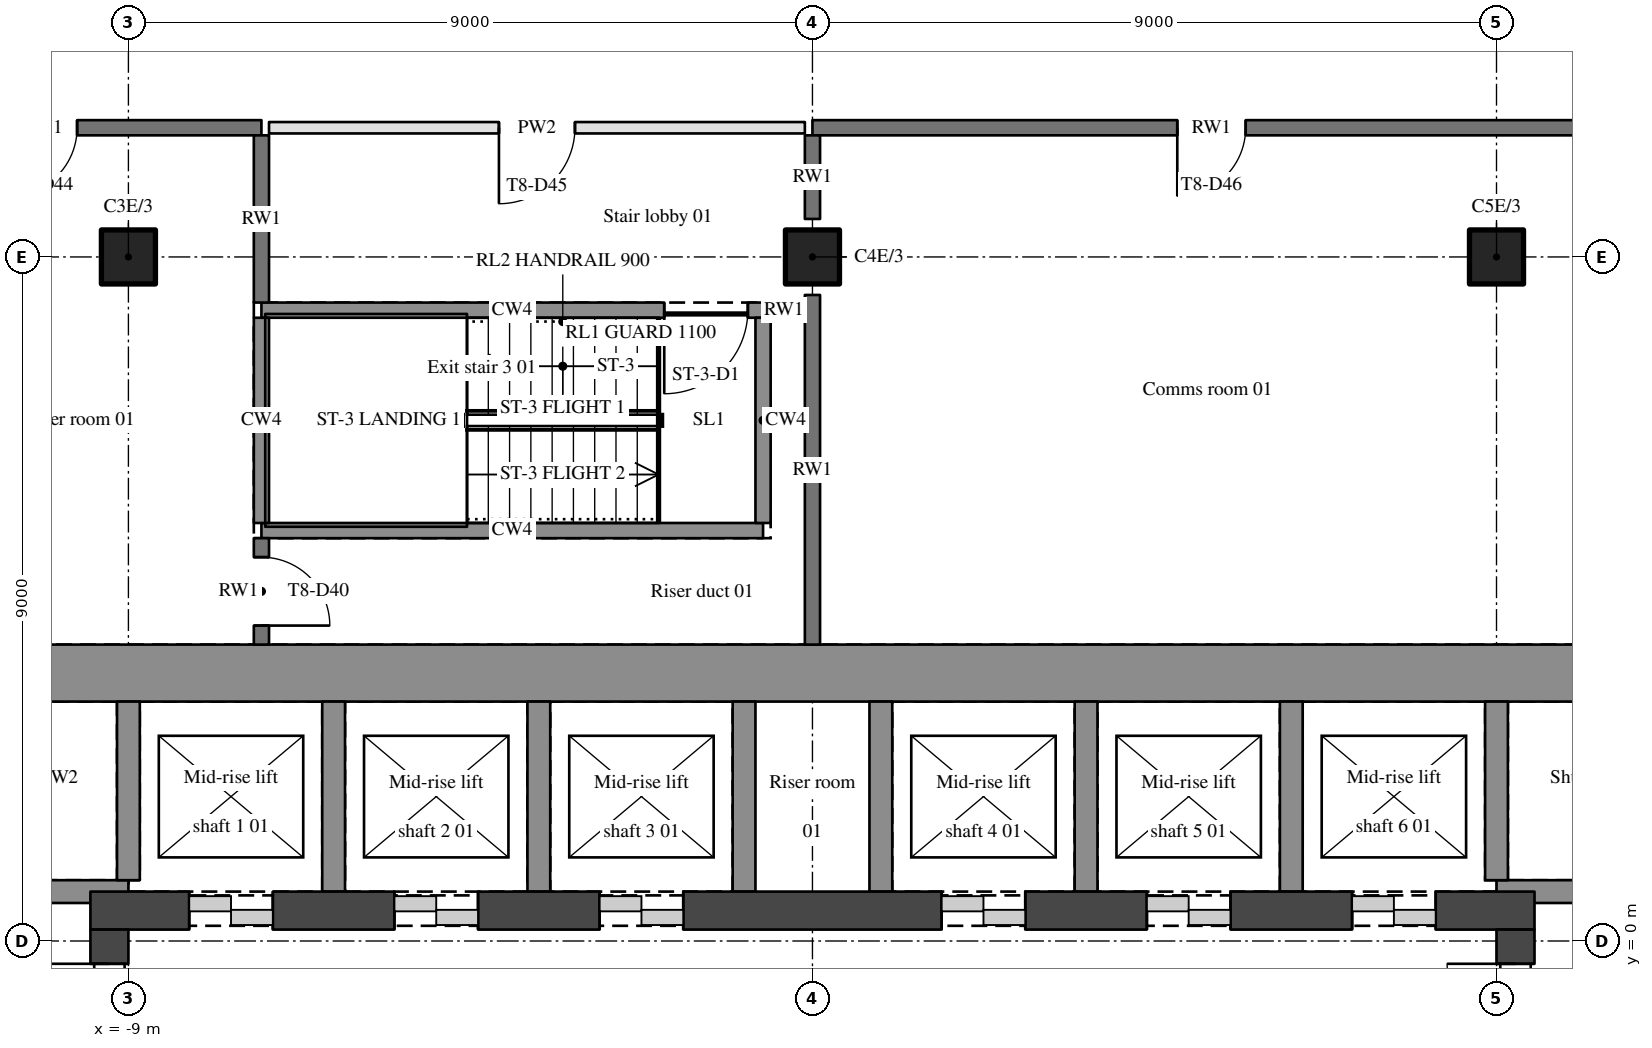
"""IFC4 building model, lengths in metres.
Left out: names, types, materials, properties, quantities, classifications, styles, units other than length and angle.
Written with IfcOpenShell. Run it as: python <this file> out.ifc"""

import sys

from ifc_helpers import new_model, si_unit, direction, frame, frame_2d, origin, origin_2d, place, context, subcontext, project, spatial, rectangle, hollow_circle, extrude, element, fill, save


model = new_model("IFC4")
c1 = context("Model", 3, precision=1e-05, world=origin(), true_north=direction((0.0, 1.0)))
c2 = subcontext(c1, "Body", "Model", "MODEL_VIEW")
j1 = project(units=[si_unit("LENGTHUNIT", "METRE"), si_unit("PLANEANGLEUNIT", "RADIAN")], contexts=[c1])
p1 = place(None, origin())
s1 = spatial("IfcSite", under=j1, at=p1, CompositionType="ELEMENT")
p2 = place(p1, origin())
s2 = spatial("IfcBuilding", under=s1, at=p2, CompositionType="ELEMENT")
p3 = place(p2, frame((0.0, 0.0, 121.5)))
s3 = spatial("IfcBuildingStorey", under=s2, at=p3, CompositionType="ELEMENT", Elevation=121.5)
for number, where, z_axis, x_axis in (
    (1, (-9.0, 9.0, 0.0), (0.0, 0.0, 1.0), (1.0, 0.0, 0.0)),
    (2, (0.0, 9.0, 0.0), (0.0, 0.0, 1.0), (1.0, 0.0, 0.0)),
    (3, (9.0, 9.0, 0.0), (0.0, 0.0, 1.0), (1.0, 0.0, 0.0)),
):
    element("IfcColumn", number, at=place(p3, frame(where, z_axis=z_axis, x_axis=x_axis)), inside=s3, PredefinedType="COLUMN", context=c2, shape_type="SweptSolid", body=[
        extrude(hollow_circle(Radius=0.355, WallThickness=0.032, at=origin_2d()), origin(), (0.0, 0.0, 1.0), 3.4),
    ])
p4 = place(p3, frame((-13.0, 3.525, 0.0), z_axis=(0.0, 0.0, 1.0), x_axis=(1.0, 0.0, 0.0)))
e4 = element("IfcWall", 4, at=p4, inside=s3, PredefinedType="SHEAR", context=c2, shape_type="SweptSolid", body=[
    extrude(rectangle(XDim=26.0, YDim=0.75, at=frame_2d((13.0, 0.0))), origin(), (0.0, 0.0, 1.0), 3.4),
])
p5 = place(p3, frame((-9.5, 0.4, 0.0), z_axis=(0.0, 0.0, 1.0), x_axis=(1.0, 0.0, 0.0)))
e5 = element("IfcWall", 5, at=p5, inside=s3, PredefinedType="SHEAR", context=c2, shape_type="SweptSolid", body=[
    extrude(rectangle(XDim=19.0, YDim=0.5, at=frame_2d((9.5, 0.0))), origin(), (0.0, 0.0, 1.0), 3.4),
])
p6 = place(p5, frame((1.3, 0.0, 0.0)))
e6 = element("IfcOpeningElement", 6, at=p6, cuts=e5, PredefinedType="OPENING", context=c2, shape_type="SweptSolid", body=[
    extrude(rectangle(XDim=1.1, YDim=2.1, at=frame_2d((0.55, 1.05))), frame((0.0, 0.26, 0.0), z_axis=(0.0, -1.0, 0.0), x_axis=(1.0, 0.0, 0.0)), (0.0, 0.0, 1.0), 0.52),
])
p7 = place(p5, frame((4.0, 0.0, 0.0)))
e7 = element("IfcOpeningElement", 7, at=p7, cuts=e5, PredefinedType="OPENING", context=c2, shape_type="SweptSolid", body=[
    extrude(rectangle(XDim=1.1, YDim=2.1, at=frame_2d((0.55, 1.05))), frame((0.0, 0.26, 0.0), z_axis=(0.0, -1.0, 0.0), x_axis=(1.0, 0.0, 0.0)), (0.0, 0.0, 1.0), 0.52),
])
p8 = place(p5, frame((6.7, 0.0, 0.0)))
e8 = element("IfcOpeningElement", 8, at=p8, cuts=e5, PredefinedType="OPENING", context=c2, shape_type="SweptSolid", body=[
    extrude(rectangle(XDim=1.1, YDim=2.1, at=frame_2d((0.55, 1.05))), frame((0.0, 0.26, 0.0), z_axis=(0.0, -1.0, 0.0), x_axis=(1.0, 0.0, 0.0)), (0.0, 0.0, 1.0), 0.52),
])
p9 = place(p5, frame((11.2, 0.0, 0.0)))
e9 = element("IfcOpeningElement", 9, at=p9, cuts=e5, PredefinedType="OPENING", context=c2, shape_type="SweptSolid", body=[
    extrude(rectangle(XDim=1.1, YDim=2.1, at=frame_2d((0.55, 1.05))), frame((0.0, 0.26, 0.0), z_axis=(0.0, -1.0, 0.0), x_axis=(1.0, 0.0, 0.0)), (0.0, 0.0, 1.0), 0.52),
])
p10 = place(p5, frame((13.9, 0.0, 0.0)))
e10 = element("IfcOpeningElement", 10, at=p10, cuts=e5, PredefinedType="OPENING", context=c2, shape_type="SweptSolid", body=[
    extrude(rectangle(XDim=1.1, YDim=2.1, at=frame_2d((0.55, 1.05))), frame((0.0, 0.26, 0.0), z_axis=(0.0, -1.0, 0.0), x_axis=(1.0, 0.0, 0.0)), (0.0, 0.0, 1.0), 0.52),
])
p11 = place(p5, frame((16.6, 0.0, 0.0)))
e11 = element("IfcOpeningElement", 11, at=p11, cuts=e5, PredefinedType="OPENING", context=c2, shape_type="SweptSolid", body=[
    extrude(rectangle(XDim=1.1, YDim=2.1, at=frame_2d((0.55, 1.05))), frame((0.0, 0.26, 0.0), z_axis=(0.0, -1.0, 0.0), x_axis=(1.0, 0.0, 0.0)), (0.0, 0.0, 1.0), 0.52),
])
p12 = place(p3, frame((-9.25, -11.5, 0.0), z_axis=(0.0, 0.0, 1.0), x_axis=(0.0, 1.0, 0.0)))
e12 = element("IfcWall", 12, at=p12, inside=s3, PredefinedType="SHEAR", context=c2, shape_type="SweptSolid", body=[
    extrude(rectangle(XDim=11.65, YDim=0.5, at=frame_2d((5.825, 0.0))), origin(), (0.0, 0.0, 1.0), 3.4),
])
p13 = place(p12, frame((9.4, 0.0, 0.0)))
e13 = element("IfcOpeningElement", 13, at=p13, cuts=e12, PredefinedType="OPENING", context=c2, shape_type="SweptSolid", body=[
    extrude(rectangle(XDim=1.8, YDim=2.1, at=frame_2d((0.9, 1.05))), frame((0.0, 0.26, 0.0), z_axis=(0.0, -1.0, 0.0), x_axis=(1.0, 0.0, 0.0)), (0.0, 0.0, 1.0), 0.52),
])
p14 = place(p12, frame((5.25, 0.0, 0.0)))
e14 = element("IfcOpeningElement", 14, at=p14, cuts=e12, PredefinedType="OPENING", context=c2, shape_type="SweptSolid", body=[
    extrude(rectangle(XDim=1.1, YDim=2.1, at=frame_2d((0.55, 1.05))), frame((0.0, 0.26, 0.0), z_axis=(0.0, -1.0, 0.0), x_axis=(1.0, 0.0, 0.0)), (0.0, 0.0, 1.0), 0.52),
])
p15 = place(p3, frame((9.25, -11.5, 0.0), z_axis=(0.0, 0.0, 1.0), x_axis=(0.0, 1.0, 0.0)))
e15 = element("IfcWall", 15, at=p15, inside=s3, PredefinedType="SHEAR", context=c2, shape_type="SweptSolid", body=[
    extrude(rectangle(XDim=11.65, YDim=0.5, at=frame_2d((5.825, 0.0))), origin(), (0.0, 0.0, 1.0), 3.4),
])
p16 = place(p15, frame((9.4, 0.0, 0.0)))
e16 = element("IfcOpeningElement", 16, at=p16, cuts=e15, PredefinedType="OPENING", context=c2, shape_type="SweptSolid", body=[
    extrude(rectangle(XDim=1.8, YDim=2.1, at=frame_2d((0.9, 1.05))), frame((0.0, 0.26, 0.0), z_axis=(0.0, -1.0, 0.0), x_axis=(1.0, 0.0, 0.0)), (0.0, 0.0, 1.0), 0.52),
])
p17 = place(p15, frame((5.25, 0.0, 0.0)))
e17 = element("IfcOpeningElement", 17, at=p17, cuts=e15, PredefinedType="OPENING", context=c2, shape_type="SweptSolid", body=[
    extrude(rectangle(XDim=1.1, YDim=2.1, at=frame_2d((0.55, 1.05))), frame((0.0, 0.26, 0.0), z_axis=(0.0, -1.0, 0.0), x_axis=(1.0, 0.0, 0.0)), (0.0, 0.0, 1.0), 0.52),
])
for number, where, z_axis, x_axis in (
    (18, (-9.0, 0.65, 0.0), (0.0, 0.0, 1.0), (-1.0, 0.0, 0.0)),
    (19, (12.25, 0.65, 0.0), (0.0, 0.0, 1.0), (-1.0, 0.0, 0.0)),
):
    element("IfcWall", number, at=place(p3, frame(where, z_axis=z_axis, x_axis=x_axis)), inside=s3, PredefinedType="SHEAR", context=c2, shape_type="SweptSolid", body=[
        extrude(rectangle(XDim=3.25, YDim=0.3, at=frame_2d((1.625, 0.0))), origin(), (0.0, 0.0, 1.0), 3.4),
    ])
p18 = place(p3, frame((-7.25, 5.4, 0.0), z_axis=(0.0, 0.0, 1.0), x_axis=(1.0, 0.0, 0.0)))
e20 = element("IfcWall", 20, at=p18, inside=s3, PredefinedType="SHEAR", context=c2, shape_type="SweptSolid", body=[
    extrude(rectangle(XDim=6.6, YDim=0.2, at=frame_2d((3.3, 0.0))), origin(), (0.0, 0.0, 1.0), 3.4),
])
p19 = place(p3, frame((-0.65, 8.3, 0.0), z_axis=(0.0, 0.0, 1.0), x_axis=(-1.0, 0.0, 0.0)))
e21 = element("IfcWall", 21, at=p19, inside=s3, PredefinedType="SHEAR", context=c2, shape_type="SweptSolid", body=[
    extrude(rectangle(XDim=6.6, YDim=0.2, at=frame_2d((3.3, 0.0))), origin(), (0.0, 0.0, 1.0), 3.4),
])
p20 = place(p19, frame((0.2, 0.0, 0.0)))
e22 = element("IfcOpeningElement", 22, at=p20, cuts=e21, PredefinedType="OPENING", context=c2, shape_type="SweptSolid", body=[
    extrude(rectangle(XDim=1.1, YDim=2.1, at=frame_2d((0.55, 1.05))), frame((0.0, 0.11, 0.0), z_axis=(0.0, -1.0, 0.0), x_axis=(1.0, 0.0, 0.0)), (0.0, 0.0, 1.0), 0.22),
])
p21 = place(p3, frame((-0.65, 8.3, 0.0), z_axis=(0.0, 0.0, 1.0), x_axis=(1.0, 0.0, 0.0)))
e23 = element("IfcWall", 23, at=p21, inside=s3, PredefinedType="SOLIDWALL", context=c2, shape_type="SweptSolid", body=[
    extrude(rectangle(XDim=0.55, YDim=0.2, at=frame_2d((0.275, 0.0))), origin(), (0.0, 0.0, 1.0), 2.46),
])
p22 = place(p3, frame((-7.25, 10.7, 0.0), z_axis=(0.0, 0.0, 1.0), x_axis=(-1.0, 0.0, 0.0)))
e24 = element("IfcWall", 24, at=p22, inside=s3, PredefinedType="SOLIDWALL", context=c2, shape_type="SweptSolid", body=[
    extrude(rectangle(XDim=5.75, YDim=0.2, at=frame_2d((2.875, 0.0))), origin(), (0.0, 0.0, 1.0), 2.46),
])
p23 = place(p22, frame((2.425, 0.0, 0.0)))
e25 = element("IfcOpeningElement", 25, at=p23, cuts=e24, PredefinedType="OPENING", context=c2, shape_type="SweptSolid", body=[
    extrude(rectangle(XDim=0.9, YDim=2.1, at=frame_2d((0.45, 1.05))), frame((0.0, 0.11, 0.0), z_axis=(0.0, -1.0, 0.0), x_axis=(1.0, 0.0, 0.0)), (0.0, 0.0, 1.0), 0.22),
])
p24 = place(p3, frame((-0.1, 10.7, 0.0), z_axis=(0.0, 0.0, 1.0), x_axis=(-1.0, 0.0, 0.0)))
e26 = element("IfcWall", 26, at=p24, inside=s3, PredefinedType="PARTITIONING", context=c2, shape_type="SweptSolid", body=[
    extrude(rectangle(XDim=7.05, YDim=0.15, at=frame_2d((3.525, 0.0))), origin(), (0.0, 0.0, 1.0), 2.46),
])
p25 = place(p24, frame((3.025, 0.0, 0.0)))
e27 = element("IfcOpeningElement", 27, at=p25, cuts=e26, PredefinedType="OPENING", context=c2, shape_type="SweptSolid", body=[
    extrude(rectangle(XDim=1.0, YDim=2.1, at=frame_2d((0.5, 1.05))), frame((0.0, 0.085, 0.0), z_axis=(0.0, -1.0, 0.0), x_axis=(1.0, 0.0, 0.0)), (0.0, 0.0, 1.0), 0.17),
])
p26 = place(p3, frame((10.5, 10.7, 0.0), z_axis=(0.0, 0.0, 1.0), x_axis=(-1.0, 0.0, 0.0)))
e28 = element("IfcWall", 28, at=p26, inside=s3, PredefinedType="SOLIDWALL", context=c2, shape_type="SweptSolid", body=[
    extrude(rectangle(XDim=10.5, YDim=0.2, at=frame_2d((5.25, 0.0))), origin(), (0.0, 0.0, 1.0), 2.46),
])
p27 = place(p26, frame((4.8, 0.0, 0.0)))
e29 = element("IfcOpeningElement", 29, at=p27, cuts=e28, PredefinedType="OPENING", context=c2, shape_type="SweptSolid", body=[
    extrude(rectangle(XDim=0.9, YDim=2.1, at=frame_2d((0.45, 1.05))), frame((0.0, 0.11, 0.0), z_axis=(0.0, -1.0, 0.0), x_axis=(1.0, 0.0, 0.0)), (0.0, 0.0, 1.0), 0.22),
])
p28 = place(p3, frame((-9.0, 0.8, 0.0), z_axis=(0.0, 0.0, 1.0), x_axis=(0.0, 1.0, 0.0)))
e30 = element("IfcWall", 30, at=p28, inside=s3, PredefinedType="SHEAR", context=c2, shape_type="SweptSolid", body=[
    extrude(rectangle(XDim=2.35, YDim=0.3, at=frame_2d((1.175, 0.0))), origin(), (0.0, 0.0, 1.0), 3.4),
])
p29 = place(p3, frame((-7.25, 5.3, 0.0), z_axis=(0.0, 0.0, 1.0), x_axis=(0.0, -1.0, 0.0)))
e31 = element("IfcWall", 31, at=p29, inside=s3, PredefinedType="SOLIDWALL", context=c2, shape_type="SweptSolid", body=[
    extrude(rectangle(XDim=1.4, YDim=0.2, at=frame_2d((0.7, 0.0))), origin(), (0.0, 0.0, 1.0), 2.46),
])
p30 = place(p29, frame((0.25, 0.0, 0.0)))
e32 = element("IfcOpeningElement", 32, at=p30, cuts=e31, PredefinedType="OPENING", context=c2, shape_type="SweptSolid", body=[
    extrude(rectangle(XDim=0.9, YDim=2.1, at=frame_2d((0.45, 1.05))), frame((0.0, 0.11, 0.0), z_axis=(0.0, -1.0, 0.0), x_axis=(1.0, 0.0, 0.0)), (0.0, 0.0, 1.0), 0.22),
])
p31 = place(p3, frame((-7.25, 5.5, 0.0), z_axis=(0.0, 0.0, 1.0), x_axis=(0.0, 1.0, 0.0)))
e33 = element("IfcWall", 33, at=p31, inside=s3, PredefinedType="SHEAR", context=c2, shape_type="SweptSolid", body=[
    extrude(rectangle(XDim=2.7, YDim=0.2, at=frame_2d((1.35, 0.0))), origin(), (0.0, 0.0, 1.0), 3.4),
])
p32 = place(p3, frame((-7.25, 8.4, 0.0), z_axis=(0.0, 0.0, 1.0), x_axis=(0.0, 1.0, 0.0)))
e34 = element("IfcWall", 34, at=p32, inside=s3, PredefinedType="SOLIDWALL", context=c2, shape_type="SweptSolid", body=[
    extrude(rectangle(XDim=2.2, YDim=0.2, at=frame_2d((1.1, 0.0))), origin(), (0.0, 0.0, 1.0), 2.46),
])
for number, where, z_axis, x_axis in (
    (35, (-6.3, 0.65, 0.0), (0.0, 0.0, 1.0), (0.0, 1.0, 0.0)),
    (36, (-3.6, 0.65, 0.0), (0.0, 0.0, 1.0), (0.0, 1.0, 0.0)),
    (37, (-0.9, 0.65, 0.0), (0.0, 0.0, 1.0), (0.0, 1.0, 0.0)),
):
    element("IfcWall", number, at=place(p3, frame(where, z_axis=z_axis, x_axis=x_axis)), inside=s3, PredefinedType="SHEAR", context=c2, shape_type="SweptSolid", body=[
        extrude(rectangle(XDim=2.5, YDim=0.3, at=frame_2d((1.25, 0.0))), origin(), (0.0, 0.0, 1.0), 3.4),
    ])
p33 = place(p3, frame((-0.65, 5.5, 0.0), z_axis=(0.0, 0.0, 1.0), x_axis=(0.0, 1.0, 0.0)))
e38 = element("IfcWall", 38, at=p33, inside=s3, PredefinedType="SHEAR", context=c2, shape_type="SweptSolid", body=[
    extrude(rectangle(XDim=2.7, YDim=0.2, at=frame_2d((1.35, 0.0))), origin(), (0.0, 0.0, 1.0), 3.4),
])
p34 = place(p3, frame((0.0, 3.9, 0.0), z_axis=(0.0, 0.0, 1.0), x_axis=(0.0, 1.0, 0.0)))
e39 = element("IfcWall", 39, at=p34, inside=s3, PredefinedType="SOLIDWALL", context=c2, shape_type="SweptSolid", body=[
    extrude(rectangle(XDim=4.6, YDim=0.2, at=frame_2d((2.3, 0.0))), origin(), (0.0, 0.0, 1.0), 2.46),
])
p35 = place(p3, frame((0.0, 9.5, 0.0), z_axis=(0.0, 0.0, 1.0), x_axis=(0.0, 1.0, 0.0)))
e40 = element("IfcWall", 40, at=p35, inside=s3, PredefinedType="SOLIDWALL", context=c2, shape_type="SweptSolid", body=[
    extrude(rectangle(XDim=1.1, YDim=0.2, at=frame_2d((0.55, 0.0))), origin(), (0.0, 0.0, 1.0), 2.46),
])
for number, where, z_axis, x_axis in (
    (41, (0.9, 0.65, 0.0), (0.0, 0.0, 1.0), (0.0, 1.0, 0.0)),
    (42, (3.6, 0.65, 0.0), (0.0, 0.0, 1.0), (0.0, 1.0, 0.0)),
    (43, (6.3, 0.65, 0.0), (0.0, 0.0, 1.0), (0.0, 1.0, 0.0)),
):
    element("IfcWall", number, at=place(p3, frame(where, z_axis=z_axis, x_axis=x_axis)), inside=s3, PredefinedType="SHEAR", context=c2, shape_type="SweptSolid", body=[
        extrude(rectangle(XDim=2.5, YDim=0.3, at=frame_2d((1.25, 0.0))), origin(), (0.0, 0.0, 1.0), 3.4),
    ])
p36 = place(p3, frame((9.0, 0.8, 0.0), z_axis=(0.0, 0.0, 1.0), x_axis=(0.0, 1.0, 0.0)))
e44 = element("IfcWall", 44, at=p36, inside=s3, PredefinedType="SHEAR", context=c2, shape_type="SweptSolid", body=[
    extrude(rectangle(XDim=2.35, YDim=0.3, at=frame_2d((1.175, 0.0))), origin(), (0.0, 0.0, 1.0), 3.4),
])
p37 = place(p25, origin())
e45 = element("IfcDoor", 45, at=p37, inside=s3, OperationType="SINGLE_SWING_RIGHT", PredefinedType="DOOR", context=c2, shape_type="SweptSolid", body=[
    extrude(rectangle(XDim=1.0, YDim=2.1, at=frame_2d((0.5, 1.05))), frame((0.0, 0.025, 0.0), z_axis=(0.0, -1.0, 0.0), x_axis=(1.0, 0.0, 0.0)), (0.0, 0.0, 1.0), 0.05),
])
fill(e27, e45)
p38 = place(p16, origin())
e46 = element("IfcDoor", 46, at=p38, inside=s3, OperationType="DOUBLE_DOOR_SINGLE_SWING", PredefinedType="DOOR", context=c2, shape_type="SweptSolid", body=[
    extrude(rectangle(XDim=1.8, YDim=2.1, at=frame_2d((0.9, 1.05))), frame((0.0, 0.025, 0.0), z_axis=(0.0, -1.0, 0.0), x_axis=(1.0, 0.0, 0.0)), (0.0, 0.0, 1.0), 0.05),
])
fill(e16, e46)
p39 = place(p13, origin())
e47 = element("IfcDoor", 47, at=p39, inside=s3, OperationType="DOUBLE_DOOR_SINGLE_SWING", PredefinedType="DOOR", context=c2, shape_type="SweptSolid", body=[
    extrude(rectangle(XDim=1.8, YDim=2.1, at=frame_2d((0.9, 1.05))), frame((0.0, 0.025, 0.0), z_axis=(0.0, -1.0, 0.0), x_axis=(1.0, 0.0, 0.0)), (0.0, 0.0, 1.0), 0.05),
])
fill(e13, e47)
p40 = place(p20, origin())
e48 = element("IfcDoor", 48, at=p40, inside=s3, OperationType="SINGLE_SWING_RIGHT", PredefinedType="DOOR", context=c2, shape_type="SweptSolid", body=[
    extrude(rectangle(XDim=1.1, YDim=2.1, at=frame_2d((0.55, 1.05))), frame((0.0, 0.025, 0.0), z_axis=(0.0, -1.0, 0.0), x_axis=(1.0, 0.0, 0.0)), (0.0, 0.0, 1.0), 0.05),
])
fill(e22, e48)
p41 = place(p30, origin())
e49 = element("IfcDoor", 49, at=p41, inside=s3, OperationType="SINGLE_SWING_RIGHT", PredefinedType="DOOR", context=c2, shape_type="SweptSolid", body=[
    extrude(rectangle(XDim=0.9, YDim=2.1, at=frame_2d((0.45, 1.05))), frame((0.0, 0.025, 0.0), z_axis=(0.0, -1.0, 0.0), x_axis=(1.0, 0.0, 0.0)), (0.0, 0.0, 1.0), 0.05),
])
fill(e32, e49)
p42 = place(p27, origin())
e50 = element("IfcDoor", 50, at=p42, inside=s3, OperationType="SINGLE_SWING_RIGHT", PredefinedType="DOOR", context=c2, shape_type="SweptSolid", body=[
    extrude(rectangle(XDim=0.9, YDim=2.1, at=frame_2d((0.45, 1.05))), frame((0.0, 0.025, 0.0), z_axis=(0.0, -1.0, 0.0), x_axis=(1.0, 0.0, 0.0)), (0.0, 0.0, 1.0), 0.05),
])
fill(e29, e50)
p43 = place(p23, origin())
e51 = element("IfcDoor", 51, at=p43, inside=s3, OperationType="SINGLE_SWING_RIGHT", PredefinedType="DOOR", context=c2, shape_type="SweptSolid", body=[
    extrude(rectangle(XDim=0.9, YDim=2.1, at=frame_2d((0.45, 1.05))), frame((0.0, 0.025, 0.0), z_axis=(0.0, -1.0, 0.0), x_axis=(1.0, 0.0, 0.0)), (0.0, 0.0, 1.0), 0.05),
])
fill(e25, e51)
p44 = place(p6, origin())
e52 = element("IfcDoor", 52, at=p44, inside=s3, OperationType="DOUBLE_DOOR_SLIDING", PredefinedType="DOOR", context=c2, shape_type="SweptSolid", body=[
    extrude(rectangle(XDim=1.1, YDim=2.1, at=frame_2d((0.55, 1.05))), frame((0.0, 0.025, 0.0), z_axis=(0.0, -1.0, 0.0), x_axis=(1.0, 0.0, 0.0)), (0.0, 0.0, 1.0), 0.05),
])
fill(e6, e52)
p45 = place(p7, origin())
e53 = element("IfcDoor", 53, at=p45, inside=s3, OperationType="DOUBLE_DOOR_SLIDING", PredefinedType="DOOR", context=c2, shape_type="SweptSolid", body=[
    extrude(rectangle(XDim=1.1, YDim=2.1, at=frame_2d((0.55, 1.05))), frame((0.0, 0.025, 0.0), z_axis=(0.0, -1.0, 0.0), x_axis=(1.0, 0.0, 0.0)), (0.0, 0.0, 1.0), 0.05),
])
fill(e7, e53)
p46 = place(p8, origin())
e54 = element("IfcDoor", 54, at=p46, inside=s3, OperationType="DOUBLE_DOOR_SLIDING", PredefinedType="DOOR", context=c2, shape_type="SweptSolid", body=[
    extrude(rectangle(XDim=1.1, YDim=2.1, at=frame_2d((0.55, 1.05))), frame((0.0, 0.025, 0.0), z_axis=(0.0, -1.0, 0.0), x_axis=(1.0, 0.0, 0.0)), (0.0, 0.0, 1.0), 0.05),
])
fill(e8, e54)
p47 = place(p9, origin())
e55 = element("IfcDoor", 55, at=p47, inside=s3, OperationType="DOUBLE_DOOR_SLIDING", PredefinedType="DOOR", context=c2, shape_type="SweptSolid", body=[
    extrude(rectangle(XDim=1.1, YDim=2.1, at=frame_2d((0.55, 1.05))), frame((0.0, 0.025, 0.0), z_axis=(0.0, -1.0, 0.0), x_axis=(1.0, 0.0, 0.0)), (0.0, 0.0, 1.0), 0.05),
])
fill(e9, e55)
p48 = place(p10, origin())
e56 = element("IfcDoor", 56, at=p48, inside=s3, OperationType="DOUBLE_DOOR_SLIDING", PredefinedType="DOOR", context=c2, shape_type="SweptSolid", body=[
    extrude(rectangle(XDim=1.1, YDim=2.1, at=frame_2d((0.55, 1.05))), frame((0.0, 0.025, 0.0), z_axis=(0.0, -1.0, 0.0), x_axis=(1.0, 0.0, 0.0)), (0.0, 0.0, 1.0), 0.05),
])
fill(e10, e56)
p49 = place(p11, origin())
e57 = element("IfcDoor", 57, at=p49, inside=s3, OperationType="DOUBLE_DOOR_SLIDING", PredefinedType="DOOR", context=c2, shape_type="SweptSolid", body=[
    extrude(rectangle(XDim=1.1, YDim=2.1, at=frame_2d((0.55, 1.05))), frame((0.0, 0.025, 0.0), z_axis=(0.0, -1.0, 0.0), x_axis=(1.0, 0.0, 0.0)), (0.0, 0.0, 1.0), 0.05),
])
fill(e11, e57)
save(model, sys.argv[1])
